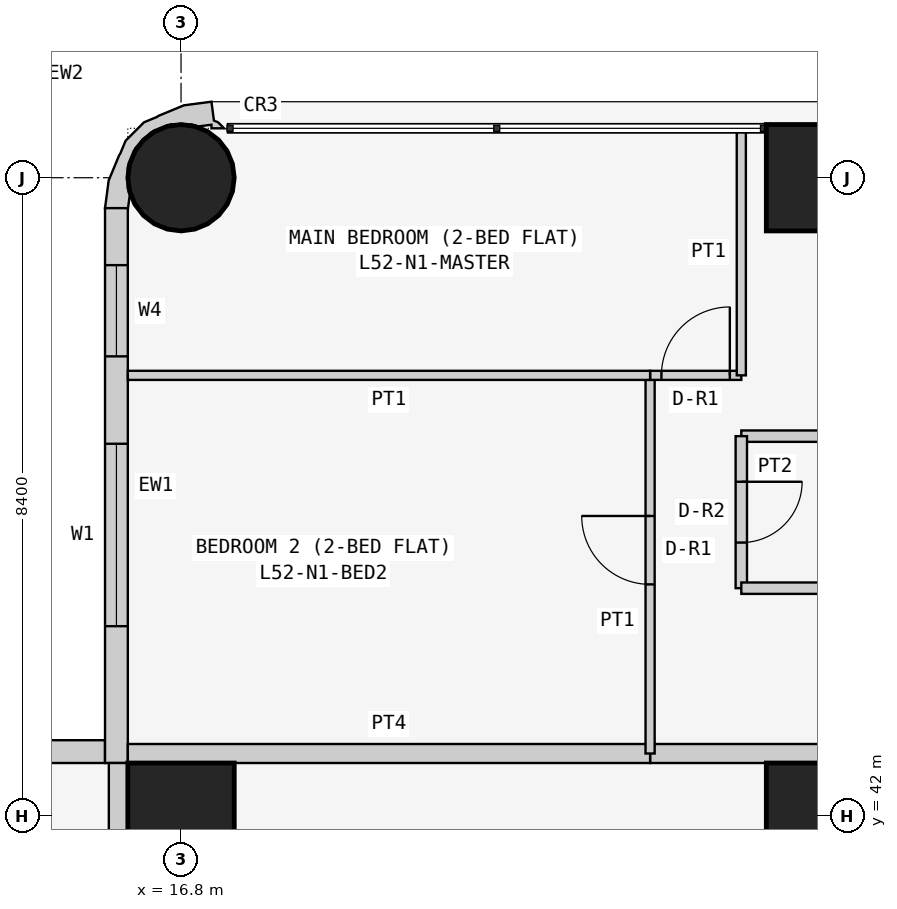
"""IFC4 building model, lengths in metres.
Left out: names, types, materials, properties, quantities, classifications, styles, units other than length and angle.
Written with IfcOpenShell. Run it as: python <this file> out.ifc"""

import sys

from ifc_helpers import new_model, si_unit, direction, frame, frame_2d, origin, origin_2d, place, context, subcontext, project, spatial, polyline, rectangle, circle, outline, extrude, element, fill, save


model = new_model("IFC4")
c1 = context("Model", 3, precision=1e-05, world=origin(), true_north=direction((0.0, 1.0)))
c2 = subcontext(c1, "Body", "Model", "MODEL_VIEW")
j1 = project(units=[si_unit("LENGTHUNIT", "METRE"), si_unit("PLANEANGLEUNIT", "RADIAN")], contexts=[c1])
p1 = place(None, origin())
s1 = spatial("IfcSite", under=j1, at=p1, CompositionType="ELEMENT")
p2 = place(p1, origin())
s2 = spatial("IfcBuilding", under=s1, at=p2, CompositionType="ELEMENT")
p3 = place(p2, frame((0.0, 0.0, 201.3)))
s3 = spatial("IfcBuildingStorey", under=s2, at=p3, CompositionType="ELEMENT", Elevation=201.3)
p4 = place(p3, frame((16.8, 42.0, 0.0), z_axis=(0.0, 0.0, 1.0), x_axis=(1.0, 0.0, 0.0)))
e1 = element("IfcColumn", 1, at=p4, inside=s3, PredefinedType="COLUMN", context=c2, shape_type="SweptSolid", body=[
    extrude(rectangle(XDim=1.4, YDim=1.4, at=origin_2d()), origin(), (0.0, 0.0, 1.0), 3.6),
])
p5 = place(p3, frame((16.8, 50.4, 0.0), z_axis=(0.0, 0.0, 1.0), x_axis=(1.0, 0.0, 0.0)))
e2 = element("IfcColumn", 2, at=p5, inside=s3, PredefinedType="COLUMN", context=c2, shape_type="SweptSolid", body=[
    extrude(circle(Radius=0.7, at=origin_2d()), origin(), (0.0, 0.0, 1.0), 3.6),
])
for number, where, z_axis, x_axis in (
    (3, (25.2, 42.0, 0.0), (0.0, 0.0, 1.0), (1.0, 0.0, 0.0)),
    (4, (25.2, 50.4, 0.0), (0.0, 0.0, 1.0), (1.0, 0.0, 0.0)),
):
    element("IfcColumn", number, at=place(p3, frame(where, z_axis=z_axis, x_axis=x_axis)), inside=s3, PredefinedType="COLUMN", context=c2, shape_type="SweptSolid", body=[
        extrude(rectangle(XDim=1.4, YDim=1.4, at=origin_2d()), origin(), (0.0, 0.0, 1.0), 3.6),
    ])
p6 = place(p3, frame((15.8, 42.85, 0.0), z_axis=(0.0, 0.0, 1.0), x_axis=(-1.0, 0.0, 0.0)))
e5 = element("IfcWall", 5, at=p6, inside=s3, PredefinedType="SOLIDWALL", context=c2, shape_type="SweptSolid", body=[
    extrude(rectangle(XDim=15.4, YDim=0.3, at=frame_2d((7.7, 0.0))), origin(), (0.0, 0.0, 1.0), 3.45),
])
p7 = place(p6, frame((1.2, 0.0, 0.9)))
e6 = element("IfcOpeningElement", 6, at=p7, cuts=e5, PredefinedType="OPENING", context=c2, shape_type="SweptSolid", body=[
    extrude(rectangle(XDim=1.8, YDim=1.5, at=frame_2d((0.9, 0.75))), frame((0.0, 0.16, 0.0), z_axis=(0.0, -1.0, 0.0), x_axis=(1.0, 0.0, 0.0)), (0.0, 0.0, 1.0), 0.32),
])
p8 = place(p6, frame((4.95, 0.0, 1.5)))
e7 = element("IfcOpeningElement", 7, at=p8, cuts=e5, PredefinedType="OPENING", context=c2, shape_type="SweptSolid", body=[
    extrude(rectangle(XDim=0.9, YDim=0.7, at=frame_2d((0.45, 0.35))), frame((0.0, 0.16, 0.0), z_axis=(0.0, -1.0, 0.0), x_axis=(1.0, 0.0, 0.0)), (0.0, 0.0, 1.0), 0.32),
])
p9 = place(p6, frame((8.5, 0.0, 0.9)))
e8 = element("IfcOpeningElement", 8, at=p9, cuts=e5, PredefinedType="OPENING", context=c2, shape_type="SweptSolid", body=[
    extrude(rectangle(XDim=1.8, YDim=1.5, at=frame_2d((0.9, 0.75))), frame((0.0, 0.16, 0.0), z_axis=(0.0, -1.0, 0.0), x_axis=(1.0, 0.0, 0.0)), (0.0, 0.0, 1.0), 0.32),
])
p10 = place(p6, frame((12.5, 0.0, 0.0)))
e9 = element("IfcOpeningElement", 9, at=p10, cuts=e5, PredefinedType="OPENING", context=c2, shape_type="SweptSolid", body=[
    extrude(rectangle(XDim=0.9, YDim=2.4, at=frame_2d((0.45, 1.2))), frame((0.0, 0.16, 0.0), z_axis=(0.0, -1.0, 0.0), x_axis=(1.0, 0.0, 0.0)), (0.0, 0.0, 1.0), 0.32),
])
p11 = place(p6, frame((13.5, 0.0, 0.9)))
e10 = element("IfcOpeningElement", 10, at=p11, cuts=e5, PredefinedType="OPENING", context=c2, shape_type="SweptSolid", body=[
    extrude(rectangle(XDim=1.2, YDim=1.5, at=frame_2d((0.6, 0.75))), frame((0.0, 0.16, 0.0), z_axis=(0.0, -1.0, 0.0), x_axis=(1.0, 0.0, 0.0)), (0.0, 0.0, 1.0), 0.32),
])
p12 = place(p3, frame((15.95, 50.0, 0.0), z_axis=(0.0, 0.0, 1.0), x_axis=(0.0, -1.0, 0.0)))
e11 = element("IfcWall", 11, at=p12, inside=s3, PredefinedType="SOLIDWALL", context=c2, shape_type="SweptSolid", body=[
    extrude(rectangle(XDim=7.3, YDim=0.3, at=frame_2d((3.65, 0.0))), origin(), (0.0, 0.0, 1.0), 3.45),
])
p13 = place(p12, frame((3.1, 0.0, 0.9)))
e12 = element("IfcOpeningElement", 12, at=p13, cuts=e11, PredefinedType="OPENING", context=c2, shape_type="SweptSolid", body=[
    extrude(rectangle(XDim=2.4, YDim=1.5, at=frame_2d((1.2, 0.75))), frame((0.0, 0.16, 0.0), z_axis=(0.0, -1.0, 0.0), x_axis=(1.0, 0.0, 0.0)), (0.0, 0.0, 1.0), 0.32),
])
p14 = place(p12, frame((0.75, 0.0, 0.9)))
e13 = element("IfcOpeningElement", 13, at=p14, cuts=e11, PredefinedType="OPENING", context=c2, shape_type="SweptSolid", body=[
    extrude(rectangle(XDim=1.2, YDim=1.5, at=frame_2d((0.6, 0.75))), frame((0.0, 0.16, 0.0), z_axis=(0.0, -1.0, 0.0), x_axis=(1.0, 0.0, 0.0)), (0.0, 0.0, 1.0), 0.32),
])
p15 = place(p3, frame((17.312, 50.988, 0.0), z_axis=(0.0, 0.0, 1.0), x_axis=(-0.439933741929, 0.898030234854, 0.0)))
e14 = element("IfcWall", 14, at=p15, inside=s3, PredefinedType="SOLIDWALL", context=c2, shape_type="SweptSolid", body=[
    extrude(outline(polyline([(0.138, -0.039), (0.182, -0.0), (0.419, -0.08), (0.536, 0.266), (0.559, 0.631), (0.555, 0.651), (0.566, 0.836), (0.456, 1.159), (0.333, 1.298), (0.324, 1.316), (0.082, 1.591), (-0.222, 1.793), (-0.39, 1.541), (-0.372, 1.532), (-0.195, 1.414), (-0.12, 1.41), (0.131, 1.287), (0.315, 1.078), (0.406, 0.814), (0.388, 0.536), (0.265, 0.285), (0.209, 0.236), (0.148, 0.053), (0.105, 0.074), (0.032, -0.076), (0.138, -0.039)])), origin(), (0.0, 0.0, 1.0), 3.45),
])
p16 = place(p3, frame((22.971, 42.825, 0.0), z_axis=(0.0, 0.0, 1.0), x_axis=(1.0, 0.0, 0.0)))
e15 = element("IfcWall", 15, at=p16, inside=s3, PredefinedType="PARTITIONING", context=c2, shape_type="SweptSolid", body=[
    extrude(rectangle(XDim=6.429, YDim=0.25, at=frame_2d((3.214, 0.0))), origin(), (0.0, 0.0, 1.0), 3.45),
])
p17 = place(p16, frame((4.929, 0.0, 0.0)))
e16 = element("IfcOpeningElement", 16, at=p17, cuts=e15, PredefinedType="OPENING", context=c2, shape_type="SweptSolid", body=[
    extrude(rectangle(XDim=1.0, YDim=2.1, at=frame_2d((0.5, 1.05))), frame((0.0, 0.135, 0.0), z_axis=(0.0, -1.0, 0.0), x_axis=(1.0, 0.0, 0.0)), (0.0, 0.0, 1.0), 0.27),
])
for number, where, z_axis, x_axis in (
    (17, (16.1, 42.825, 0.0), (0.0, 0.0, 1.0), (1.0, 0.0, 0.0)),
    (18, (15.975, 35.829, 0.0), (0.0, 0.0, 1.0), (0.0, 1.0, 0.0)),
):
    element("IfcWall", number, at=place(p3, frame(where, z_axis=z_axis, x_axis=x_axis)), inside=s3, PredefinedType="PARTITIONING", context=c2, shape_type="SweptSolid", body=[
        extrude(rectangle(XDim=6.871, YDim=0.25, at=frame_2d((3.436, 0.0))), origin(), (0.0, 0.0, 1.0), 3.45),
    ])
p18 = place(p3, frame((29.4, 47.0, 0.0), z_axis=(0.0, 0.0, 1.0), x_axis=(-1.0, 0.0, 0.0)))
e19 = element("IfcWall", 19, at=p18, inside=s3, PredefinedType="PARTITIONING", context=c2, shape_type="SweptSolid", body=[
    extrude(rectangle(XDim=5.229, YDim=0.15, at=frame_2d((2.615, 0.0))), origin(), (0.0, 0.0, 1.0), 3.45),
])
p19 = place(p3, frame((24.171, 47.0, 0.0), z_axis=(0.0, 0.0, 1.0), x_axis=(0.0, -1.0, 0.0)))
e20 = element("IfcWall", 20, at=p19, inside=s3, PredefinedType="PARTITIONING", context=c2, shape_type="SweptSolid", body=[
    extrude(rectangle(XDim=2.0, YDim=0.15, at=frame_2d((1.0, 0.0))), origin(), (0.0, 0.0, 1.0), 3.45),
])
p20 = place(p19, frame((0.6, 0.0, 0.0)))
e21 = element("IfcOpeningElement", 21, at=p20, cuts=e20, PredefinedType="OPENING", context=c2, shape_type="SweptSolid", body=[
    extrude(rectangle(XDim=0.8, YDim=2.1, at=frame_2d((0.4, 1.05))), frame((0.0, 0.085, 0.0), z_axis=(0.0, -1.0, 0.0), x_axis=(1.0, 0.0, 0.0)), (0.0, 0.0, 1.0), 0.17),
])
p21 = place(p3, frame((24.171, 45.0, 0.0), z_axis=(0.0, 0.0, 1.0), x_axis=(1.0, 0.0, 0.0)))
e22 = element("IfcWall", 22, at=p21, inside=s3, PredefinedType="PARTITIONING", context=c2, shape_type="SweptSolid", body=[
    extrude(rectangle(XDim=5.229, YDim=0.15, at=frame_2d((2.615, 0.0))), origin(), (0.0, 0.0, 1.0), 3.45),
])
p22 = place(p3, frame((22.971, 42.825, 0.0), z_axis=(0.0, 0.0, 1.0), x_axis=(0.0, 1.0, 0.0)))
e23 = element("IfcWall", 23, at=p22, inside=s3, PredefinedType="PARTITIONING", context=c2, shape_type="SweptSolid", body=[
    extrude(rectangle(XDim=4.975, YDim=0.12, at=frame_2d((2.488, 0.0))), origin(), (0.0, 0.0, 1.0), 3.45),
])
p23 = place(p22, frame((2.225, 0.0, 0.0)))
e24 = element("IfcOpeningElement", 24, at=p23, cuts=e23, PredefinedType="OPENING", context=c2, shape_type="SweptSolid", body=[
    extrude(rectangle(XDim=0.9, YDim=2.1, at=frame_2d((0.45, 1.05))), frame((0.0, 0.07, 0.0), z_axis=(0.0, -1.0, 0.0), x_axis=(1.0, 0.0, 0.0)), (0.0, 0.0, 1.0), 0.14),
])
p24 = place(p3, frame((22.971, 47.8, 0.0), z_axis=(0.0, 0.0, 1.0), x_axis=(1.0, 0.0, 0.0)))
e25 = element("IfcWall", 25, at=p24, inside=s3, PredefinedType="PARTITIONING", context=c2, shape_type="SweptSolid", body=[
    extrude(rectangle(XDim=1.2, YDim=0.12, at=frame_2d((0.6, 0.0))), origin(), (0.0, 0.0, 1.0), 3.45),
])
p25 = place(p24, frame((0.149, 0.0, 0.0)))
e26 = element("IfcOpeningElement", 26, at=p25, cuts=e25, PredefinedType="OPENING", context=c2, shape_type="SweptSolid", body=[
    extrude(rectangle(XDim=0.9, YDim=2.1, at=frame_2d((0.45, 1.05))), frame((0.0, 0.07, 0.0), z_axis=(0.0, -1.0, 0.0), x_axis=(1.0, 0.0, 0.0)), (0.0, 0.0, 1.0), 0.14),
])
p26 = place(p3, frame((24.171, 47.8, 0.0), z_axis=(0.0, 0.0, 1.0), x_axis=(0.0, 1.0, 0.0)))
e27 = element("IfcWall", 27, at=p26, inside=s3, PredefinedType="PARTITIONING", context=c2, shape_type="SweptSolid", body=[
    extrude(rectangle(XDim=3.25, YDim=0.12, at=frame_2d((1.625, 0.0))), origin(), (0.0, 0.0, 1.0), 3.45),
])
p27 = place(p3, frame((22.971, 47.8, 0.0), z_axis=(0.0, 0.0, 1.0), x_axis=(-1.0, 0.0, 0.0)))
e28 = element("IfcWall", 28, at=p27, inside=s3, PredefinedType="PARTITIONING", context=c2, shape_type="SweptSolid", body=[
    extrude(rectangle(XDim=6.871, YDim=0.12, at=frame_2d((3.436, 0.0))), origin(), (0.0, 0.0, 1.0), 3.45),
])
p28 = place(p13, origin())
e29 = element("IfcWindow", 29, at=p28, inside=s3, PartitioningType="SINGLE_PANEL", PredefinedType="WINDOW", context=c2, shape_type="SweptSolid", body=[
    extrude(rectangle(XDim=2.4, YDim=1.5, at=frame_2d((1.2, 0.75))), frame((0.0, 0.03, 0.0), z_axis=(0.0, -1.0, 0.0), x_axis=(1.0, 0.0, 0.0)), (0.0, 0.0, 1.0), 0.06),
])
fill(e12, e29)
p29 = place(p14, origin())
e30 = element("IfcWindow", 30, at=p29, inside=s3, PartitioningType="SINGLE_PANEL", PredefinedType="WINDOW", context=c2, shape_type="SweptSolid", body=[
    extrude(rectangle(XDim=1.2, YDim=1.5, at=frame_2d((0.6, 0.75))), frame((0.0, 0.03, 0.0), z_axis=(0.0, -1.0, 0.0), x_axis=(1.0, 0.0, 0.0)), (0.0, 0.0, 1.0), 0.06),
])
fill(e13, e30)
p30 = place(p20, origin())
e31 = element("IfcDoor", 31, at=p30, inside=s3, OperationType="SINGLE_SWING_LEFT", PredefinedType="DOOR", context=c2, shape_type="SweptSolid", body=[
    extrude(rectangle(XDim=0.8, YDim=2.1, at=frame_2d((0.4, 1.05))), frame((0.0, 0.025, 0.0), z_axis=(0.0, -1.0, 0.0), x_axis=(1.0, 0.0, 0.0)), (0.0, 0.0, 1.0), 0.05),
])
fill(e21, e31)
p31 = place(p23, origin())
e32 = element("IfcDoor", 32, at=p31, inside=s3, OperationType="SINGLE_SWING_RIGHT", PredefinedType="DOOR", context=c2, shape_type="SweptSolid", body=[
    extrude(rectangle(XDim=0.9, YDim=2.1, at=frame_2d((0.45, 1.05))), frame((0.0, 0.025, 0.0), z_axis=(0.0, -1.0, 0.0), x_axis=(1.0, 0.0, 0.0)), (0.0, 0.0, 1.0), 0.05),
])
fill(e24, e32)
p32 = place(p25, origin())
e33 = element("IfcDoor", 33, at=p32, inside=s3, OperationType="SINGLE_SWING_RIGHT", PredefinedType="DOOR", context=c2, shape_type="SweptSolid", body=[
    extrude(rectangle(XDim=0.9, YDim=2.1, at=frame_2d((0.45, 1.05))), frame((0.0, 0.025, 0.0), z_axis=(0.0, -1.0, 0.0), x_axis=(1.0, 0.0, 0.0)), (0.0, 0.0, 1.0), 0.05),
])
fill(e26, e33)
save(model, sys.argv[1])
